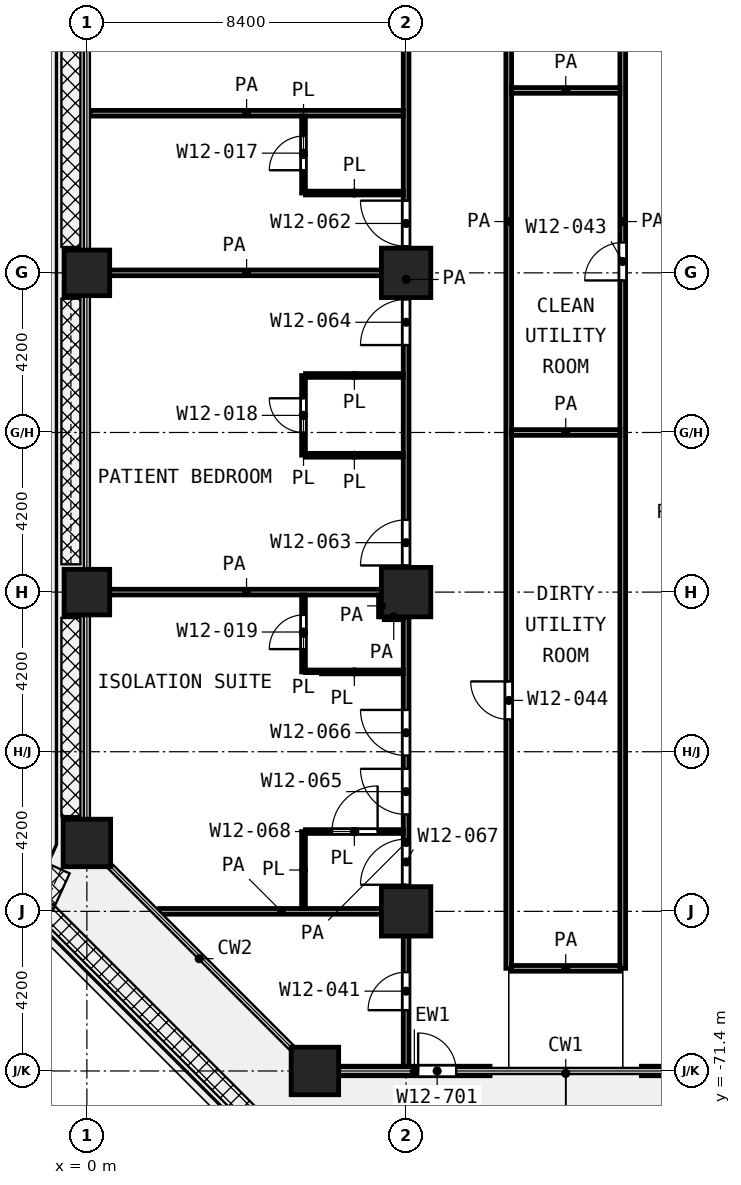
"""IFC4 building model, lengths in metres.
Left out: names, types, materials, properties, quantities, classifications, styles, units other than length and angle.
Written with IfcOpenShell. Run it as: python <this file> out.ifc"""

import sys

from ifc_helpers import new_model, si_unit, direction, frame, frame_2d, origin, origin_2d, place, context, subcontext, project, spatial, rectangle, extrude, element, fill, save


model = new_model("IFC4")
c1 = context("Model", 3, precision=1e-05, world=origin(), true_north=direction((0.0, 1.0)))
c2 = subcontext(c1, "Body", "Model", "MODEL_VIEW")
j1 = project(units=[si_unit("LENGTHUNIT", "METRE"), si_unit("PLANEANGLEUNIT", "RADIAN")], contexts=[c1])
p1 = place(None, origin())
s1 = spatial("IfcSite", under=j1, at=p1, CompositionType="ELEMENT")
p2 = place(p1, origin())
s2 = spatial("IfcBuilding", under=s1, at=p2, CompositionType="ELEMENT")
p3 = place(p2, frame((0.0, 0.0, 77.0)))
s3 = spatial("IfcBuildingStorey", under=s2, at=p3, CompositionType="ELEMENT", Elevation=77.0)
p4 = place(p3, frame((0.0, -50.4, 0.0), z_axis=(0.0, 0.0, 1.0), x_axis=(1.0, 0.0, 0.0)))
e1 = element("IfcColumn", 1, at=p4, inside=s3, PredefinedType="COLUMN", context=c2, shape_type="SweptSolid", body=[
    extrude(rectangle(XDim=1.2, YDim=1.2, at=origin_2d()), origin(), (0.0, 0.0, 1.0), 4.2),
])
p5 = place(p3, frame((8.4, -50.4, 0.0), z_axis=(0.0, 0.0, 1.0), x_axis=(1.0, 0.0, 0.0)))
e2 = element("IfcColumn", 2, at=p5, inside=s3, PredefinedType="COLUMN", context=c2, shape_type="SweptSolid", body=[
    extrude(rectangle(XDim=1.3, YDim=1.3, at=origin_2d()), origin(), (0.0, 0.0, 1.0), 4.2),
])
p6 = place(p3, frame((0.0, -58.8, 0.0), z_axis=(0.0, 0.0, 1.0), x_axis=(1.0, 0.0, 0.0)))
e3 = element("IfcColumn", 3, at=p6, inside=s3, PredefinedType="COLUMN", context=c2, shape_type="SweptSolid", body=[
    extrude(rectangle(XDim=1.2, YDim=1.2, at=origin_2d()), origin(), (0.0, 0.0, 1.0), 4.2),
])
p7 = place(p3, frame((8.4, -58.8, 0.0), z_axis=(0.0, 0.0, 1.0), x_axis=(1.0, 0.0, 0.0)))
e4 = element("IfcColumn", 4, at=p7, inside=s3, PredefinedType="COLUMN", context=c2, shape_type="SweptSolid", body=[
    extrude(rectangle(XDim=1.3, YDim=1.3, at=origin_2d()), origin(), (0.0, 0.0, 1.0), 4.2),
])
p8 = place(p3, frame((0.0, -65.4, 0.0), z_axis=(0.0, 0.0, 1.0), x_axis=(1.0, 0.0, 0.0)))
e5 = element("IfcColumn", 5, at=p8, inside=s3, PredefinedType="COLUMN", context=c2, shape_type="SweptSolid", body=[
    extrude(rectangle(XDim=1.25, YDim=1.25, at=origin_2d()), origin(), (0.0, 0.0, 1.0), 4.2),
])
p9 = place(p3, frame((8.4, -67.2, 0.0), z_axis=(0.0, 0.0, 1.0), x_axis=(1.0, 0.0, 0.0)))
e6 = element("IfcColumn", 6, at=p9, inside=s3, PredefinedType="COLUMN", context=c2, shape_type="SweptSolid", body=[
    extrude(rectangle(XDim=1.3, YDim=1.3, at=origin_2d()), origin(), (0.0, 0.0, 1.0), 4.2),
])
p10 = place(p3, frame((6.0, -71.4, 0.0), z_axis=(0.0, 0.0, 1.0), x_axis=(1.0, 0.0, 0.0)))
e7 = element("IfcColumn", 7, at=p10, inside=s3, PredefinedType="COLUMN", context=c2, shape_type="SweptSolid", body=[
    extrude(rectangle(XDim=1.25, YDim=1.25, at=origin_2d()), origin(), (0.0, 0.0, 1.0), 4.2),
])
p11 = place(p3, frame((6.625, -71.4, 0.0), z_axis=(0.0, 0.0, 1.0), x_axis=(1.0, 0.0, 0.0)))
e8 = element("IfcWall", 8, at=p11, inside=s3, PredefinedType="SOLIDWALL", context=c2, shape_type="SweptSolid", body=[
    extrude(rectangle(XDim=3.983, YDim=0.25, at=frame_2d((1.992, 0.0))), origin(), (0.0, 0.0, 1.0), 3.78),
])
p12 = place(p11, frame((2.092, 0.0, 0.0)))
e9 = element("IfcOpeningElement", 9, at=p12, cuts=e8, PredefinedType="OPENING", context=c2, shape_type="SweptSolid", body=[
    extrude(rectangle(XDim=1.0, YDim=2.1, at=frame_2d((0.5, 1.05))), frame((0.0, 0.135, 0.0), z_axis=(0.0, -1.0, 0.0), x_axis=(1.0, 0.0, 0.0)), (0.0, 0.0, 1.0), 0.27),
])
p13 = place(p3, frame((14.592, -71.4, 0.0), z_axis=(0.0, 0.0, 1.0), x_axis=(1.0, 0.0, 0.0)))
e10 = element("IfcWall", 10, at=p13, inside=s3, PredefinedType="SOLIDWALL", context=c2, shape_type="SweptSolid", body=[
    extrude(rectangle(XDim=3.983, YDim=0.25, at=frame_2d((1.992, 0.0))), origin(), (0.0, 0.0, 1.0), 3.78),
])
p14 = place(p13, frame((0.892, 0.0, 0.0)))
e11 = element("IfcOpeningElement", 11, at=p14, cuts=e10, PredefinedType="OPENING", context=c2, shape_type="SweptSolid", body=[
    extrude(rectangle(XDim=1.0, YDim=2.1, at=frame_2d((0.5, 1.05))), frame((0.0, 0.135, 0.0), z_axis=(0.0, -1.0, 0.0), x_axis=(1.0, 0.0, 0.0)), (0.0, 0.0, 1.0), 0.27),
])
p15 = place(p3, frame((5.75, -65.1, 0.0), z_axis=(0.0, 0.0, 1.0), x_axis=(1.0, 0.0, 0.0)))
e12 = element("IfcWall", 12, at=p15, inside=s3, PredefinedType="PARTITIONING", context=c2, shape_type="SweptSolid", body=[
    extrude(rectangle(XDim=2.575, YDim=0.1, at=frame_2d((1.288, 0.0))), origin(), (0.0, 0.0, 1.0), 3.9),
])
p16 = place(p15, frame((0.7, 0.0, 0.0)))
e13 = element("IfcOpeningElement", 13, at=p16, cuts=e12, PredefinedType="OPENING", context=c2, shape_type="SweptSolid", body=[
    extrude(rectangle(XDim=1.2, YDim=2.1, at=frame_2d((0.6, 1.05))), frame((0.0, 0.06, 0.0), z_axis=(0.0, -1.0, 0.0), x_axis=(1.0, 0.0, 0.0)), (0.0, 0.0, 1.0), 0.12),
])
p17 = place(p3, frame((5.75, -60.9, 0.0), z_axis=(0.0, 0.0, 1.0), x_axis=(1.0, 0.0, 0.0)))
e14 = element("IfcWall", 14, at=p17, inside=s3, PredefinedType="PARTITIONING", context=c2, shape_type="SweptSolid", body=[
    extrude(rectangle(XDim=2.575, YDim=0.1, at=frame_2d((1.288, 0.0))), origin(), (0.0, 0.0, 1.0), 3.9),
])
p18 = place(p3, frame((5.751, -55.2, 0.0), z_axis=(0.0, 0.0, 1.0), x_axis=(1.0, 0.0, 0.0)))
e15 = element("IfcWall", 15, at=p18, inside=s3, PredefinedType="PARTITIONING", context=c2, shape_type="SweptSolid", body=[
    extrude(rectangle(XDim=2.574, YDim=0.1, at=frame_2d((1.287, 0.0))), origin(), (0.0, 0.0, 1.0), 3.9),
])
p19 = place(p3, frame((5.752, -53.1, 0.0), z_axis=(0.0, 0.0, 1.0), x_axis=(1.0, 0.0, 0.0)))
e16 = element("IfcWall", 16, at=p19, inside=s3, PredefinedType="PARTITIONING", context=c2, shape_type="SweptSolid", body=[
    extrude(rectangle(XDim=2.573, YDim=0.1, at=frame_2d((1.287, 0.0))), origin(), (0.0, 0.0, 1.0), 3.9),
])
p20 = place(p3, frame((5.75, -48.3, 0.0), z_axis=(0.0, 0.0, 1.0), x_axis=(1.0, 0.0, 0.0)))
e17 = element("IfcWall", 17, at=p20, inside=s3, PredefinedType="PARTITIONING", context=c2, shape_type="SweptSolid", body=[
    extrude(rectangle(XDim=2.575, YDim=0.1, at=frame_2d((1.288, 0.0))), origin(), (0.0, 0.0, 1.0), 3.9),
])
p21 = place(p3, frame((5.7, -67.125, 0.0), z_axis=(0.0, 0.0, 1.0), x_axis=(0.0, 1.0, 0.0)))
e18 = element("IfcWall", 18, at=p21, inside=s3, PredefinedType="PARTITIONING", context=c2, shape_type="SweptSolid", body=[
    extrude(rectangle(XDim=2.025, YDim=0.1, at=frame_2d((1.012, 0.0))), origin(), (0.0, 0.0, 1.0), 3.9),
])
p22 = place(p3, frame((5.7, -60.9, 0.0), z_axis=(0.0, 0.0, 1.0), x_axis=(0.0, 1.0, 0.0)))
e19 = element("IfcWall", 19, at=p22, inside=s3, PredefinedType="PARTITIONING", context=c2, shape_type="SweptSolid", body=[
    extrude(rectangle(XDim=2.025, YDim=0.1, at=frame_2d((1.012, 0.0))), origin(), (0.0, 0.0, 1.0), 3.9),
])
p23 = place(p22, frame((0.6, 0.0, 0.0)))
e20 = element("IfcOpeningElement", 20, at=p23, cuts=e19, PredefinedType="OPENING", context=c2, shape_type="SweptSolid", body=[
    extrude(rectangle(XDim=0.9, YDim=2.1, at=frame_2d((0.45, 1.05))), frame((0.0, 0.06, 0.0), z_axis=(0.0, -1.0, 0.0), x_axis=(1.0, 0.0, 0.0)), (0.0, 0.0, 1.0), 0.12),
])
p24 = place(p3, frame((5.7, -55.198, 0.0), z_axis=(0.0, 0.0, 1.0), x_axis=(0.0, 1.0, 0.0)))
e21 = element("IfcWall", 21, at=p24, inside=s3, PredefinedType="PARTITIONING", context=c2, shape_type="SweptSolid", body=[
    extrude(rectangle(XDim=2.096, YDim=0.1, at=frame_2d((1.048, 0.0))), origin(), (0.0, 0.0, 1.0), 3.9),
])
p25 = place(p24, frame((0.598, 0.0, 0.0)))
e22 = element("IfcOpeningElement", 22, at=p25, cuts=e21, PredefinedType="OPENING", context=c2, shape_type="SweptSolid", body=[
    extrude(rectangle(XDim=0.9, YDim=2.1, at=frame_2d((0.45, 1.05))), frame((0.0, 0.06, 0.0), z_axis=(0.0, -1.0, 0.0), x_axis=(1.0, 0.0, 0.0)), (0.0, 0.0, 1.0), 0.12),
])
p26 = place(p3, frame((5.7, -48.3, 0.0), z_axis=(0.0, 0.0, 1.0), x_axis=(0.0, 1.0, 0.0)))
e23 = element("IfcWall", 23, at=p26, inside=s3, PredefinedType="PARTITIONING", context=c2, shape_type="SweptSolid", body=[
    extrude(rectangle(XDim=2.025, YDim=0.1, at=frame_2d((1.013, 0.0))), origin(), (0.0, 0.0, 1.0), 3.9),
])
p27 = place(p26, frame((0.6, 0.0, 0.0)))
e24 = element("IfcOpeningElement", 24, at=p27, cuts=e23, PredefinedType="OPENING", context=c2, shape_type="SweptSolid", body=[
    extrude(rectangle(XDim=0.9, YDim=2.1, at=frame_2d((0.45, 1.05))), frame((0.0, 0.06, 0.0), z_axis=(0.0, -1.0, 0.0), x_axis=(1.0, 0.0, 0.0)), (0.0, 0.0, 1.0), 0.12),
])
p28 = place(p3, frame((11.175, -68.7, 0.0), z_axis=(0.0, 0.0, 1.0), x_axis=(1.0, 0.0, 0.0)))
e25 = element("IfcWall", 25, at=p28, inside=s3, PredefinedType="PARTITIONING", context=c2, shape_type="SweptSolid", body=[
    extrude(rectangle(XDim=2.85, YDim=0.15, at=frame_2d((1.425, 0.0))), origin(), (0.0, 0.0, 1.0), 3.9),
])
p29 = place(p3, frame((1.913, -67.2, 0.0), z_axis=(0.0, 0.0, 1.0), x_axis=(1.0, 0.0, 0.0)))
e26 = element("IfcWall", 26, at=p29, inside=s3, PredefinedType="PARTITIONING", context=c2, shape_type="SweptSolid", body=[
    extrude(rectangle(XDim=6.412, YDim=0.15, at=frame_2d((3.206, 0.0))), origin(), (0.0, 0.0, 1.0), 3.9),
])
p30 = place(p3, frame((7.825, -59.45, 0.0), z_axis=(0.0, 0.0, 1.0), x_axis=(1.0, 0.0, 0.0)))
e27 = element("IfcWall", 27, at=p30, inside=s3, PredefinedType="PARTITIONING", context=c2, shape_type="SweptSolid", body=[
    extrude(rectangle(XDim=0.498, YDim=0.15, at=frame_2d((0.249, 0.0))), origin(), (0.0, 0.0, 1.0), 3.9),
])
p31 = place(p3, frame((0.08, -58.8, 0.0), z_axis=(0.0, 0.0, 1.0), x_axis=(1.0, 0.0, 0.0)))
e28 = element("IfcWall", 28, at=p31, inside=s3, PredefinedType="PARTITIONING", context=c2, shape_type="SweptSolid", body=[
    extrude(rectangle(XDim=8.243, YDim=0.15, at=frame_2d((4.122, 0.0))), origin(), (0.0, 0.0, 1.0), 3.9),
])
p32 = place(p3, frame((11.175, -54.6, 0.0), z_axis=(0.0, 0.0, 1.0), x_axis=(1.0, 0.0, 0.0)))
e29 = element("IfcWall", 29, at=p32, inside=s3, PredefinedType="PARTITIONING", context=c2, shape_type="SweptSolid", body=[
    extrude(rectangle(XDim=2.85, YDim=0.15, at=frame_2d((1.425, 0.0))), origin(), (0.0, 0.0, 1.0), 3.9),
])
for number, where, z_axis, x_axis in (
    (30, (0.08, -50.4, 0.0), (0.0, 0.0, 1.0), (1.0, 0.0, 0.0)),
    (31, (0.08, -46.2, 0.0), (0.0, 0.0, 1.0), (1.0, 0.0, 0.0)),
):
    element("IfcWall", number, at=place(p3, frame(where, z_axis=z_axis, x_axis=x_axis)), inside=s3, PredefinedType="PARTITIONING", context=c2, shape_type="SweptSolid", body=[
        extrude(rectangle(XDim=8.245, YDim=0.15, at=frame_2d((4.123, 0.0))), origin(), (0.0, 0.0, 1.0), 3.9),
    ])
p33 = place(p3, frame((11.175, -45.6, 0.0), z_axis=(0.0, 0.0, 1.0), x_axis=(1.0, 0.0, 0.0)))
e32 = element("IfcWall", 32, at=p33, inside=s3, PredefinedType="PARTITIONING", context=c2, shape_type="SweptSolid", body=[
    extrude(rectangle(XDim=2.85, YDim=0.15, at=frame_2d((1.425, 0.0))), origin(), (0.0, 0.0, 1.0), 3.9),
])
p34 = place(p3, frame((7.75, -59.45, 0.0), z_axis=(0.0, 0.0, 1.0), x_axis=(0.0, 1.0, 0.0)))
e33 = element("IfcWall", 33, at=p34, inside=s3, PredefinedType="PARTITIONING", context=c2, shape_type="SweptSolid", body=[
    extrude(rectangle(XDim=0.575, YDim=0.15, at=frame_2d((0.288, 0.0))), origin(), (0.0, 0.0, 1.0), 3.9),
])
p35 = place(p3, frame((8.4, -71.32, 0.0), z_axis=(0.0, 0.0, 1.0), x_axis=(0.0, 1.0, 0.0)))
e34 = element("IfcWall", 34, at=p35, inside=s3, PredefinedType="PARTITIONING", context=c2, shape_type="SweptSolid", body=[
    extrude(rectangle(XDim=11.868, YDim=0.15, at=frame_2d((5.934, 0.0))), origin(), (0.0, 0.0, 1.0), 3.9),
])
p36 = place(p35, frame((6.67, 0.0, 0.0)))
e35 = element("IfcOpeningElement", 35, at=p36, cuts=e34, PredefinedType="OPENING", context=c2, shape_type="SweptSolid", body=[
    extrude(rectangle(XDim=1.2, YDim=2.1, at=frame_2d((0.6, 1.05))), frame((0.0, 0.085, 0.0), z_axis=(0.0, -1.0, 0.0), x_axis=(1.0, 0.0, 0.0)), (0.0, 0.0, 1.0), 0.17),
])
p37 = place(p35, frame((8.22, 0.0, 0.0)))
e36 = element("IfcOpeningElement", 36, at=p37, cuts=e34, PredefinedType="OPENING", context=c2, shape_type="SweptSolid", body=[
    extrude(rectangle(XDim=1.2, YDim=2.1, at=frame_2d((0.6, 1.05))), frame((0.0, 0.085, 0.0), z_axis=(0.0, -1.0, 0.0), x_axis=(1.0, 0.0, 0.0)), (0.0, 0.0, 1.0), 0.17),
])
p38 = place(p35, frame((4.82, 0.0, 0.0)))
e37 = element("IfcOpeningElement", 37, at=p38, cuts=e34, PredefinedType="OPENING", context=c2, shape_type="SweptSolid", body=[
    extrude(rectangle(XDim=1.2, YDim=2.1, at=frame_2d((0.6, 1.05))), frame((0.0, 0.085, 0.0), z_axis=(0.0, -1.0, 0.0), x_axis=(1.0, 0.0, 0.0)), (0.0, 0.0, 1.0), 0.17),
])
p39 = place(p35, frame((1.52, 0.0, 0.0)))
e38 = element("IfcOpeningElement", 38, at=p39, cuts=e34, PredefinedType="OPENING", context=c2, shape_type="SweptSolid", body=[
    extrude(rectangle(XDim=1.0, YDim=2.1, at=frame_2d((0.5, 1.05))), frame((0.0, 0.085, 0.0), z_axis=(0.0, -1.0, 0.0), x_axis=(1.0, 0.0, 0.0)), (0.0, 0.0, 1.0), 0.17),
])
p40 = place(p3, frame((8.4, -58.798, 0.0), z_axis=(0.0, 0.0, 1.0), x_axis=(0.0, 1.0, 0.0)))
e39 = element("IfcWall", 39, at=p40, inside=s3, PredefinedType="PARTITIONING", context=c2, shape_type="SweptSolid", body=[
    extrude(rectangle(XDim=16.448, YDim=0.15, at=frame_2d((8.224, 0.0))), origin(), (0.0, 0.0, 1.0), 3.9),
])
p41 = place(p40, frame((9.098, 0.0, 0.0)))
e40 = element("IfcOpeningElement", 40, at=p41, cuts=e39, PredefinedType="OPENING", context=c2, shape_type="SweptSolid", body=[
    extrude(rectangle(XDim=1.2, YDim=2.1, at=frame_2d((0.6, 1.05))), frame((0.0, 0.085, 0.0), z_axis=(0.0, -1.0, 0.0), x_axis=(1.0, 0.0, 0.0)), (0.0, 0.0, 1.0), 0.17),
])
p42 = place(p40, frame((0.699, 0.0, 0.0)))
e41 = element("IfcOpeningElement", 41, at=p42, cuts=e39, PredefinedType="OPENING", context=c2, shape_type="SweptSolid", body=[
    extrude(rectangle(XDim=1.2, YDim=2.1, at=frame_2d((0.6, 1.05))), frame((0.0, 0.085, 0.0), z_axis=(0.0, -1.0, 0.0), x_axis=(1.0, 0.0, 0.0)), (0.0, 0.0, 1.0), 0.17),
])
p43 = place(p40, frame((6.498, 0.0, 0.0)))
e42 = element("IfcOpeningElement", 42, at=p43, cuts=e39, PredefinedType="OPENING", context=c2, shape_type="SweptSolid", body=[
    extrude(rectangle(XDim=1.2, YDim=2.1, at=frame_2d((0.6, 1.05))), frame((0.0, 0.085, 0.0), z_axis=(0.0, -1.0, 0.0), x_axis=(1.0, 0.0, 0.0)), (0.0, 0.0, 1.0), 0.17),
])
p44 = place(p3, frame((11.1, -68.7, 0.0), z_axis=(0.0, 0.0, 1.0), x_axis=(0.0, 1.0, 0.0)))
e43 = element("IfcWall", 43, at=p44, inside=s3, PredefinedType="PARTITIONING", context=c2, shape_type="SweptSolid", body=[
    extrude(rectangle(XDim=39.3, YDim=0.15, at=frame_2d((19.65, 0.0))), origin(), (0.0, 0.0, 1.0), 3.9),
])
p45 = place(p44, frame((34.35, 0.0, 0.0)))
e44 = element("IfcOpeningElement", 44, at=p45, cuts=e43, PredefinedType="OPENING", context=c2, shape_type="SweptSolid", body=[
    extrude(rectangle(XDim=1.2, YDim=2.1, at=frame_2d((0.6, 1.05))), frame((0.0, 0.085, 0.0), z_axis=(0.0, -1.0, 0.0), x_axis=(1.0, 0.0, 0.0)), (0.0, 0.0, 1.0), 0.17),
])
p46 = place(p44, frame((26.35, 0.0, 0.0)))
e45 = element("IfcOpeningElement", 45, at=p46, cuts=e43, PredefinedType="OPENING", context=c2, shape_type="SweptSolid", body=[
    extrude(rectangle(XDim=1.0, YDim=2.1, at=frame_2d((0.5, 1.05))), frame((0.0, 0.085, 0.0), z_axis=(0.0, -1.0, 0.0), x_axis=(1.0, 0.0, 0.0)), (0.0, 0.0, 1.0), 0.17),
])
p47 = place(p44, frame((6.55, 0.0, 0.0)))
e46 = element("IfcOpeningElement", 46, at=p47, cuts=e43, PredefinedType="OPENING", context=c2, shape_type="SweptSolid", body=[
    extrude(rectangle(XDim=1.0, YDim=2.1, at=frame_2d((0.5, 1.05))), frame((0.0, 0.085, 0.0), z_axis=(0.0, -1.0, 0.0), x_axis=(1.0, 0.0, 0.0)), (0.0, 0.0, 1.0), 0.17),
])
p48 = place(p3, frame((14.1, -68.7, 0.0), z_axis=(0.0, 0.0, 1.0), x_axis=(0.0, 1.0, 0.0)))
e47 = element("IfcWall", 47, at=p48, inside=s3, PredefinedType="PARTITIONING", context=c2, shape_type="SweptSolid", body=[
    extrude(rectangle(XDim=39.3, YDim=0.15, at=frame_2d((19.65, 0.0))), origin(), (0.0, 0.0, 1.0), 3.9),
])
p49 = place(p48, frame((18.1, 0.0, 0.0)))
e48 = element("IfcOpeningElement", 48, at=p49, cuts=e47, PredefinedType="OPENING", context=c2, shape_type="SweptSolid", body=[
    extrude(rectangle(XDim=1.0, YDim=2.1, at=frame_2d((0.5, 1.05))), frame((0.0, 0.085, 0.0), z_axis=(0.0, -1.0, 0.0), x_axis=(1.0, 0.0, 0.0)), (0.0, 0.0, 1.0), 0.17),
])
p50 = place(p12, origin())
e49 = element("IfcDoor", 49, at=p50, inside=s3, OperationType="SINGLE_SWING_LEFT", PredefinedType="DOOR", context=c2, shape_type="SweptSolid", body=[
    extrude(rectangle(XDim=1.0, YDim=2.1, at=frame_2d((0.5, 1.05))), frame((0.0, 0.025, 0.0), z_axis=(0.0, -1.0, 0.0), x_axis=(1.0, 0.0, 0.0)), (0.0, 0.0, 1.0), 0.05),
])
fill(e9, e49)
p51 = place(p41, origin())
e50 = element("IfcDoor", 50, at=p51, inside=s3, OperationType="SINGLE_SWING_RIGHT", PredefinedType="DOOR", context=c2, shape_type="SweptSolid", body=[
    extrude(rectangle(XDim=1.2, YDim=2.1, at=frame_2d((0.6, 1.05))), frame((0.0, 0.025, 0.0), z_axis=(0.0, -1.0, 0.0), x_axis=(1.0, 0.0, 0.0)), (0.0, 0.0, 1.0), 0.05),
])
fill(e40, e50)
p52 = place(p27, origin())
e51 = element("IfcDoor", 51, at=p52, inside=s3, OperationType="SINGLE_SWING_LEFT", PredefinedType="DOOR", context=c2, shape_type="SweptSolid", body=[
    extrude(rectangle(XDim=0.9, YDim=2.1, at=frame_2d((0.45, 1.05))), frame((0.0, 0.025, 0.0), z_axis=(0.0, -1.0, 0.0), x_axis=(1.0, 0.0, 0.0)), (0.0, 0.0, 1.0), 0.05),
])
fill(e24, e51)
p53 = place(p42, origin())
e52 = element("IfcDoor", 52, at=p53, inside=s3, OperationType="SINGLE_SWING_LEFT", PredefinedType="DOOR", context=c2, shape_type="SweptSolid", body=[
    extrude(rectangle(XDim=1.2, YDim=2.1, at=frame_2d((0.6, 1.05))), frame((0.0, 0.025, 0.0), z_axis=(0.0, -1.0, 0.0), x_axis=(1.0, 0.0, 0.0)), (0.0, 0.0, 1.0), 0.05),
])
fill(e41, e52)
p54 = place(p43, origin())
e53 = element("IfcDoor", 53, at=p54, inside=s3, OperationType="SINGLE_SWING_LEFT", PredefinedType="DOOR", context=c2, shape_type="SweptSolid", body=[
    extrude(rectangle(XDim=1.2, YDim=2.1, at=frame_2d((0.6, 1.05))), frame((0.0, 0.025, 0.0), z_axis=(0.0, -1.0, 0.0), x_axis=(1.0, 0.0, 0.0)), (0.0, 0.0, 1.0), 0.05),
])
fill(e42, e53)
p55 = place(p25, origin())
e54 = element("IfcDoor", 54, at=p55, inside=s3, OperationType="SINGLE_SWING_RIGHT", PredefinedType="DOOR", context=c2, shape_type="SweptSolid", body=[
    extrude(rectangle(XDim=0.9, YDim=2.1, at=frame_2d((0.45, 1.05))), frame((0.0, 0.025, 0.0), z_axis=(0.0, -1.0, 0.0), x_axis=(1.0, 0.0, 0.0)), (0.0, 0.0, 1.0), 0.05),
])
fill(e22, e54)
p56 = place(p36, origin())
e55 = element("IfcDoor", 55, at=p56, inside=s3, OperationType="SINGLE_SWING_RIGHT", PredefinedType="DOOR", context=c2, shape_type="SweptSolid", body=[
    extrude(rectangle(XDim=1.2, YDim=2.1, at=frame_2d((0.6, 1.05))), frame((0.0, 0.025, 0.0), z_axis=(0.0, -1.0, 0.0), x_axis=(1.0, 0.0, 0.0)), (0.0, 0.0, 1.0), 0.05),
])
fill(e35, e55)
p57 = place(p37, origin())
e56 = element("IfcDoor", 56, at=p57, inside=s3, OperationType="SINGLE_SWING_RIGHT", PredefinedType="DOOR", context=c2, shape_type="SweptSolid", body=[
    extrude(rectangle(XDim=1.2, YDim=2.1, at=frame_2d((0.6, 1.05))), frame((0.0, 0.025, 0.0), z_axis=(0.0, -1.0, 0.0), x_axis=(1.0, 0.0, 0.0)), (0.0, 0.0, 1.0), 0.05),
])
fill(e36, e56)
p58 = place(p38, origin())
e57 = element("IfcDoor", 57, at=p58, inside=s3, OperationType="SINGLE_SWING_LEFT", PredefinedType="DOOR", context=c2, shape_type="SweptSolid", body=[
    extrude(rectangle(XDim=1.2, YDim=2.1, at=frame_2d((0.6, 1.05))), frame((0.0, 0.025, 0.0), z_axis=(0.0, -1.0, 0.0), x_axis=(1.0, 0.0, 0.0)), (0.0, 0.0, 1.0), 0.05),
])
fill(e37, e57)
p59 = place(p16, origin())
e58 = element("IfcDoor", 58, at=p59, inside=s3, OperationType="SINGLE_SWING_RIGHT", PredefinedType="DOOR", context=c2, shape_type="SweptSolid", body=[
    extrude(rectangle(XDim=1.2, YDim=2.1, at=frame_2d((0.6, 1.05))), frame((0.0, 0.025, 0.0), z_axis=(0.0, -1.0, 0.0), x_axis=(1.0, 0.0, 0.0)), (0.0, 0.0, 1.0), 0.05),
])
fill(e13, e58)
p60 = place(p23, origin())
e59 = element("IfcDoor", 59, at=p60, inside=s3, OperationType="SINGLE_SWING_LEFT", PredefinedType="DOOR", context=c2, shape_type="SweptSolid", body=[
    extrude(rectangle(XDim=0.9, YDim=2.1, at=frame_2d((0.45, 1.05))), frame((0.0, 0.025, 0.0), z_axis=(0.0, -1.0, 0.0), x_axis=(1.0, 0.0, 0.0)), (0.0, 0.0, 1.0), 0.05),
])
fill(e20, e59)
p61 = place(p39, origin())
e60 = element("IfcDoor", 60, at=p61, inside=s3, OperationType="SINGLE_SWING_LEFT", PredefinedType="DOOR", context=c2, shape_type="SweptSolid", body=[
    extrude(rectangle(XDim=1.0, YDim=2.1, at=frame_2d((0.5, 1.05))), frame((0.0, 0.025, 0.0), z_axis=(0.0, -1.0, 0.0), x_axis=(1.0, 0.0, 0.0)), (0.0, 0.0, 1.0), 0.05),
])
fill(e38, e60)
p62 = place(p49, origin())
e61 = element("IfcDoor", 61, at=p62, inside=s3, OperationType="SINGLE_SWING_LEFT", PredefinedType="DOOR", context=c2, shape_type="SweptSolid", body=[
    extrude(rectangle(XDim=1.0, YDim=2.1, at=frame_2d((0.5, 1.05))), frame((0.0, 0.025, 0.0), z_axis=(0.0, -1.0, 0.0), x_axis=(1.0, 0.0, 0.0)), (0.0, 0.0, 1.0), 0.05),
])
fill(e48, e61)
p63 = place(p47, origin())
e62 = element("IfcDoor", 62, at=p63, inside=s3, OperationType="SINGLE_SWING_RIGHT", PredefinedType="DOOR", context=c2, shape_type="SweptSolid", body=[
    extrude(rectangle(XDim=1.0, YDim=2.1, at=frame_2d((0.5, 1.05))), frame((0.0, 0.025, 0.0), z_axis=(0.0, -1.0, 0.0), x_axis=(1.0, 0.0, 0.0)), (0.0, 0.0, 1.0), 0.05),
])
fill(e46, e62)
save(model, sys.argv[1])
